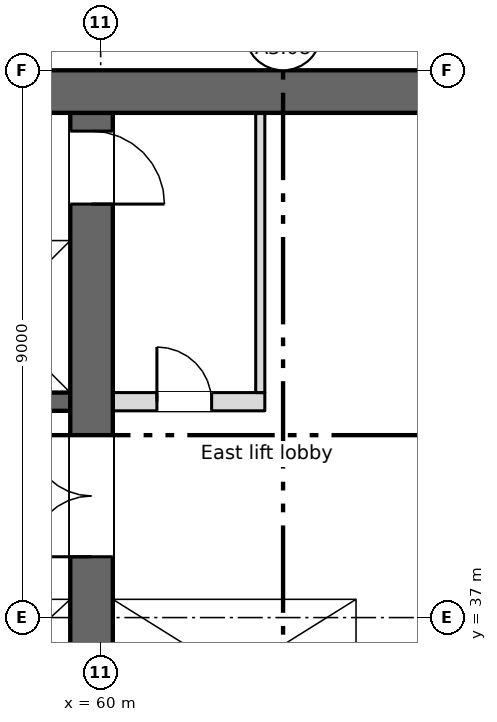
"""IFC4 building model, lengths in metres.
Left out: names, types, materials, properties, quantities, classifications, styles, units other than length and angle.
Written with IfcOpenShell. Run it as: python <this file> out.ifc"""

import sys

from ifc_helpers import new_model, si_unit, direction, frame, frame_2d, origin, place, context, subcontext, project, spatial, rectangle, extrude, element, fill, save


model = new_model("IFC4")
c1 = context("Model", 3, precision=1e-05, world=origin(), true_north=direction((0.0, 1.0)))
c2 = subcontext(c1, "Body", "Model", "MODEL_VIEW")
j1 = project(units=[si_unit("LENGTHUNIT", "METRE"), si_unit("PLANEANGLEUNIT", "RADIAN")], contexts=[c1])
p1 = place(None, origin())
s1 = spatial("IfcSite", under=j1, at=p1, CompositionType="ELEMENT")
p2 = place(p1, origin())
s2 = spatial("IfcBuilding", under=s1, at=p2, CompositionType="ELEMENT")
p3 = place(p2, frame((0.0, 0.0, 223.0)))
s3 = spatial("IfcBuildingStorey", under=s2, at=p3, CompositionType="ELEMENT", Elevation=223.0)
p4 = place(p3, frame((11.55, 45.65, 0.0), z_axis=(0.0, 0.0, 1.0), x_axis=(1.0, 0.0, 0.0)))
e1 = element("IfcWall", 1, at=p4, inside=s3, PredefinedType="SHEAR", context=c2, shape_type="SweptSolid", body=[
    extrude(rectangle(XDim=54.9, YDim=0.7, at=frame_2d((27.45, 0.0))), origin(), (0.0, 0.0, 1.0), 3.15),
])
p5 = place(p4, frame((1.2, 0.0, 0.6)))
e2 = element("IfcOpeningElement", 2, at=p5, cuts=e1, PredefinedType="OPENING", context=c2, shape_type="SweptSolid", body=[
    extrude(rectangle(XDim=0.6, YDim=2.4, at=frame_2d((0.3, 1.2))), frame((0.0, 0.36, 0.0), z_axis=(0.0, -1.0, 0.0), x_axis=(1.0, 0.0, 0.0)), (0.0, 0.0, 1.0), 0.72),
])
p6 = place(p3, frame((64.35, 34.8, 0.0), z_axis=(0.0, 0.0, 1.0), x_axis=(0.0, 1.0, 0.0)))
e3 = element("IfcWall", 3, at=p6, inside=s3, PredefinedType="SHEAR", context=c2, shape_type="SweptSolid", body=[
    extrude(rectangle(XDim=10.5, YDim=0.3, at=frame_2d((5.25, 0.0))), origin(), (0.0, 0.0, 1.0), 3.15),
])
p7 = place(p3, frame((59.85, 28.4, 0.0), z_axis=(0.0, 0.0, 1.0), x_axis=(0.0, 1.0, 0.0)))
e4 = element("IfcWall", 4, at=p7, inside=s3, PredefinedType="SHEAR", context=c2, shape_type="SweptSolid", body=[
    extrude(rectangle(XDim=16.9, YDim=0.7, at=frame_2d((8.45, 0.0))), origin(), (0.0, 0.0, 1.0), 3.15),
])
p8 = place(p7, frame((9.6, 0.0, 0.0)))
e5 = element("IfcOpeningElement", 5, at=p8, cuts=e4, PredefinedType="OPENING", context=c2, shape_type="SweptSolid", body=[
    extrude(rectangle(XDim=2.0, YDim=2.1, at=frame_2d((1.0, 1.05))), frame((0.0, 0.36, 0.0), z_axis=(0.0, -1.0, 0.0), x_axis=(1.0, 0.0, 0.0)), (0.0, 0.0, 1.0), 0.72),
])
p9 = place(p7, frame((15.4, 0.0, 0.0)))
e6 = element("IfcOpeningElement", 6, at=p9, cuts=e4, PredefinedType="OPENING", context=c2, shape_type="SweptSolid", body=[
    extrude(rectangle(XDim=1.2, YDim=2.1, at=frame_2d((0.6, 1.05))), frame((0.0, 0.36, 0.0), z_axis=(0.0, -1.0, 0.0), x_axis=(1.0, 0.0, 0.0)), (0.0, 0.0, 1.0), 0.72),
])
p10 = place(p3, frame((47.3, 37.45, 0.0), z_axis=(0.0, 0.0, 1.0), x_axis=(1.0, 0.0, 0.0)))
e7 = element("IfcWall", 7, at=p10, inside=s3, PredefinedType="SHEAR", context=c2, shape_type="SweptSolid", body=[
    extrude(rectangle(XDim=12.2, YDim=0.3, at=frame_2d((6.1, 0.0))), origin(), (0.0, 0.0, 1.0), 3.15),
])
p11 = place(p10, frame((4.3, 0.0, 0.0)))
e8 = element("IfcOpeningElement", 8, at=p11, cuts=e7, PredefinedType="OPENING", context=c2, shape_type="SweptSolid", body=[
    extrude(rectangle(XDim=1.1, YDim=2.1, at=frame_2d((0.55, 1.05))), frame((0.0, 0.16, 0.0), z_axis=(0.0, -1.0, 0.0), x_axis=(1.0, 0.0, 0.0)), (0.0, 0.0, 1.0), 0.32),
])
p12 = place(p10, frame((7.3, 0.0, 0.0)))
e9 = element("IfcOpeningElement", 9, at=p12, cuts=e7, PredefinedType="OPENING", context=c2, shape_type="SweptSolid", body=[
    extrude(rectangle(XDim=1.1, YDim=2.1, at=frame_2d((0.55, 1.05))), frame((0.0, 0.16, 0.0), z_axis=(0.0, -1.0, 0.0), x_axis=(1.0, 0.0, 0.0)), (0.0, 0.0, 1.0), 0.32),
])
p13 = place(p10, frame((10.3, 0.0, 0.0)))
e10 = element("IfcOpeningElement", 10, at=p13, cuts=e7, PredefinedType="OPENING", context=c2, shape_type="SweptSolid", body=[
    extrude(rectangle(XDim=1.1, YDim=2.1, at=frame_2d((0.55, 1.05))), frame((0.0, 0.16, 0.0), z_axis=(0.0, -1.0, 0.0), x_axis=(1.0, 0.0, 0.0)), (0.0, 0.0, 1.0), 0.32),
])
p14 = place(p3, frame((60.2, 37.45, 0.0), z_axis=(0.0, 0.0, 1.0), x_axis=(1.0, 0.0, 0.0)))
e11 = element("IfcWall", 11, at=p14, inside=s3, PredefinedType="SHEAR", context=c2, shape_type="SweptSolid", body=[
    extrude(rectangle(XDim=4.0, YDim=0.3, at=frame_2d((2.0, 0.0))), origin(), (0.0, 0.0, 1.0), 3.15),
])
p15 = place(p14, frame((1.45, 0.0, 0.0)))
e12 = element("IfcOpeningElement", 12, at=p15, cuts=e11, PredefinedType="OPENING", context=c2, shape_type="SweptSolid", body=[
    extrude(rectangle(XDim=1.1, YDim=2.1, at=frame_2d((0.55, 1.05))), frame((0.0, 0.16, 0.0), z_axis=(0.0, -1.0, 0.0), x_axis=(1.0, 0.0, 0.0)), (0.0, 0.0, 1.0), 0.32),
])
p16 = place(p3, frame((18.5, 40.55, 0.0), z_axis=(0.0, 0.0, 1.0), x_axis=(1.0, 0.0, 0.0)))
e13 = element("IfcWall", 13, at=p16, inside=s3, PredefinedType="SHEAR", context=c2, shape_type="SweptSolid", body=[
    extrude(rectangle(XDim=41.0, YDim=0.3, at=frame_2d((20.5, 0.0))), origin(), (0.0, 0.0, 1.0), 3.15),
])
p17 = place(p16, frame((2.15, 0.0, 0.0)))
e14 = element("IfcOpeningElement", 14, at=p17, cuts=e13, PredefinedType="OPENING", context=c2, shape_type="SweptSolid", body=[
    extrude(rectangle(XDim=0.9, YDim=2.1, at=frame_2d((0.45, 1.05))), frame((0.0, 0.16, 0.0), z_axis=(0.0, -1.0, 0.0), x_axis=(1.0, 0.0, 0.0)), (0.0, 0.0, 1.0), 0.32),
])
p18 = place(p16, frame((15.9, 0.0, 0.0)))
e15 = element("IfcOpeningElement", 15, at=p18, cuts=e13, PredefinedType="OPENING", context=c2, shape_type="SweptSolid", body=[
    extrude(rectangle(XDim=0.9, YDim=2.1, at=frame_2d((0.45, 1.05))), frame((0.0, 0.16, 0.0), z_axis=(0.0, -1.0, 0.0), x_axis=(1.0, 0.0, 0.0)), (0.0, 0.0, 1.0), 0.32),
])
p19 = place(p16, frame((21.4, 0.0, 0.0)))
e16 = element("IfcOpeningElement", 16, at=p19, cuts=e13, PredefinedType="OPENING", context=c2, shape_type="SweptSolid", body=[
    extrude(rectangle(XDim=0.9, YDim=2.1, at=frame_2d((0.45, 1.05))), frame((0.0, 0.16, 0.0), z_axis=(0.0, -1.0, 0.0), x_axis=(1.0, 0.0, 0.0)), (0.0, 0.0, 1.0), 0.32),
])
p20 = place(p16, frame((26.9, 0.0, 0.0)))
e17 = element("IfcOpeningElement", 17, at=p20, cuts=e13, PredefinedType="OPENING", context=c2, shape_type="SweptSolid", body=[
    extrude(rectangle(XDim=0.9, YDim=2.1, at=frame_2d((0.45, 1.05))), frame((0.0, 0.16, 0.0), z_axis=(0.0, -1.0, 0.0), x_axis=(1.0, 0.0, 0.0)), (0.0, 0.0, 1.0), 0.32),
])
p21 = place(p16, frame((6.175, 0.0, 0.0)))
e18 = element("IfcOpeningElement", 18, at=p21, cuts=e13, PredefinedType="OPENING", context=c2, shape_type="SweptSolid", body=[
    extrude(rectangle(XDim=1.1, YDim=2.1, at=frame_2d((0.55, 1.05))), frame((0.0, 0.16, 0.0), z_axis=(0.0, -1.0, 0.0), x_axis=(1.0, 0.0, 0.0)), (0.0, 0.0, 1.0), 0.32),
])
p22 = place(p16, frame((8.925, 0.0, 0.0)))
e19 = element("IfcOpeningElement", 19, at=p22, cuts=e13, PredefinedType="OPENING", context=c2, shape_type="SweptSolid", body=[
    extrude(rectangle(XDim=1.1, YDim=2.1, at=frame_2d((0.55, 1.05))), frame((0.0, 0.16, 0.0), z_axis=(0.0, -1.0, 0.0), x_axis=(1.0, 0.0, 0.0)), (0.0, 0.0, 1.0), 0.32),
])
p23 = place(p16, frame((11.675, 0.0, 0.0)))
e20 = element("IfcOpeningElement", 20, at=p23, cuts=e13, PredefinedType="OPENING", context=c2, shape_type="SweptSolid", body=[
    extrude(rectangle(XDim=1.1, YDim=2.1, at=frame_2d((0.55, 1.05))), frame((0.0, 0.16, 0.0), z_axis=(0.0, -1.0, 0.0), x_axis=(1.0, 0.0, 0.0)), (0.0, 0.0, 1.0), 0.32),
])
p24 = place(p16, frame((30.925, 0.0, 0.0)))
e21 = element("IfcOpeningElement", 21, at=p24, cuts=e13, PredefinedType="OPENING", context=c2, shape_type="SweptSolid", body=[
    extrude(rectangle(XDim=1.1, YDim=2.1, at=frame_2d((0.55, 1.05))), frame((0.0, 0.16, 0.0), z_axis=(0.0, -1.0, 0.0), x_axis=(1.0, 0.0, 0.0)), (0.0, 0.0, 1.0), 0.32),
])
p25 = place(p16, frame((33.675, 0.0, 0.0)))
e22 = element("IfcOpeningElement", 22, at=p25, cuts=e13, PredefinedType="OPENING", context=c2, shape_type="SweptSolid", body=[
    extrude(rectangle(XDim=1.1, YDim=2.1, at=frame_2d((0.55, 1.05))), frame((0.0, 0.16, 0.0), z_axis=(0.0, -1.0, 0.0), x_axis=(1.0, 0.0, 0.0)), (0.0, 0.0, 1.0), 0.32),
])
p26 = place(p16, frame((36.375, 0.0, 0.0)))
e23 = element("IfcOpeningElement", 23, at=p26, cuts=e13, PredefinedType="OPENING", context=c2, shape_type="SweptSolid", body=[
    extrude(rectangle(XDim=1.2, YDim=2.1, at=frame_2d((0.6, 1.05))), frame((0.0, 0.16, 0.0), z_axis=(0.0, -1.0, 0.0), x_axis=(1.0, 0.0, 0.0)), (0.0, 0.0, 1.0), 0.32),
])
p27 = place(p16, frame((39.15, 0.0, 0.0)))
e24 = element("IfcOpeningElement", 24, at=p27, cuts=e13, PredefinedType="OPENING", context=c2, shape_type="SweptSolid", body=[
    extrude(rectangle(XDim=1.2, YDim=2.1, at=frame_2d((0.6, 1.05))), frame((0.0, 0.16, 0.0), z_axis=(0.0, -1.0, 0.0), x_axis=(1.0, 0.0, 0.0)), (0.0, 0.0, 1.0), 0.32),
])
p28 = place(p3, frame((18.5, 43.35, 0.0), z_axis=(0.0, 0.0, 1.0), x_axis=(1.0, 0.0, 0.0)))
e25 = element("IfcWall", 25, at=p28, inside=s3, PredefinedType="SHEAR", context=c2, shape_type="SweptSolid", body=[
    extrude(rectangle(XDim=41.0, YDim=0.3, at=frame_2d((20.5, 0.0))), origin(), (0.0, 0.0, 1.0), 3.15),
])
p29 = place(p3, frame((60.2, 40.55, 0.0), z_axis=(0.0, 0.0, 1.0), x_axis=(1.0, 0.0, 0.0)))
e26 = element("IfcWall", 26, at=p29, inside=s3, PredefinedType="PARTITIONING", context=c2, shape_type="SweptSolid", body=[
    extrude(rectangle(XDim=2.5, YDim=0.3, at=frame_2d((1.25, 0.0))), origin(), (0.0, 0.0, 1.0), 3.15),
])
p30 = place(p29, frame((0.725, 0.0, 0.0)))
e27 = element("IfcOpeningElement", 27, at=p30, cuts=e26, PredefinedType="OPENING", context=c2, shape_type="SweptSolid", body=[
    extrude(rectangle(XDim=0.9, YDim=2.1, at=frame_2d((0.45, 1.05))), frame((0.0, 0.16, 0.0), z_axis=(0.0, -1.0, 0.0), x_axis=(1.0, 0.0, 0.0)), (0.0, 0.0, 1.0), 0.32),
])
p31 = place(p3, frame((62.625, 40.7, 0.0), z_axis=(0.0, 0.0, 1.0), x_axis=(0.0, 1.0, 0.0)))
e28 = element("IfcWall", 28, at=p31, inside=s3, PredefinedType="PARTITIONING", context=c2, shape_type="SweptSolid", body=[
    extrude(rectangle(XDim=4.6, YDim=0.15, at=frame_2d((2.3, 0.0))), origin(), (0.0, 0.0, 1.0), 3.15),
])
p32 = place(p30, origin())
e29 = element("IfcDoor", 29, at=p32, inside=s3, OperationType="SINGLE_SWING_LEFT", PredefinedType="DOOR", context=c2, shape_type="SweptSolid", body=[
    extrude(rectangle(XDim=0.9, YDim=2.1, at=frame_2d((0.45, 1.05))), frame((0.0, 0.025, 0.0), z_axis=(0.0, -1.0, 0.0), x_axis=(1.0, 0.0, 0.0)), (0.0, 0.0, 1.0), 0.05),
])
fill(e27, e29)
p33 = place(p15, origin())
e30 = element("IfcDoor", 30, at=p33, inside=s3, OperationType="SLIDING_TO_LEFT", PredefinedType="DOOR", context=c2, shape_type="SweptSolid", body=[
    extrude(rectangle(XDim=1.1, YDim=2.1, at=frame_2d((0.55, 1.05))), frame((0.0, 0.025, 0.0), z_axis=(0.0, -1.0, 0.0), x_axis=(1.0, 0.0, 0.0)), (0.0, 0.0, 1.0), 0.05),
])
fill(e12, e30)
p34 = place(p8, origin())
e31 = element("IfcDoor", 31, at=p34, inside=s3, OperationType="DOUBLE_DOOR_SINGLE_SWING", PredefinedType="DOOR", context=c2, shape_type="SweptSolid", body=[
    extrude(rectangle(XDim=2.0, YDim=2.1, at=frame_2d((1.0, 1.05))), frame((0.0, 0.025, 0.0), z_axis=(0.0, -1.0, 0.0), x_axis=(1.0, 0.0, 0.0)), (0.0, 0.0, 1.0), 0.05),
])
fill(e5, e31)
p35 = place(p9, origin())
e32 = element("IfcDoor", 32, at=p35, inside=s3, OperationType="SINGLE_SWING_LEFT", PredefinedType="DOOR", context=c2, shape_type="SweptSolid", body=[
    extrude(rectangle(XDim=1.2, YDim=2.1, at=frame_2d((0.6, 1.05))), frame((0.0, 0.025, 0.0), z_axis=(0.0, -1.0, 0.0), x_axis=(1.0, 0.0, 0.0)), (0.0, 0.0, 1.0), 0.05),
])
fill(e6, e32)
save(model, sys.argv[1])
